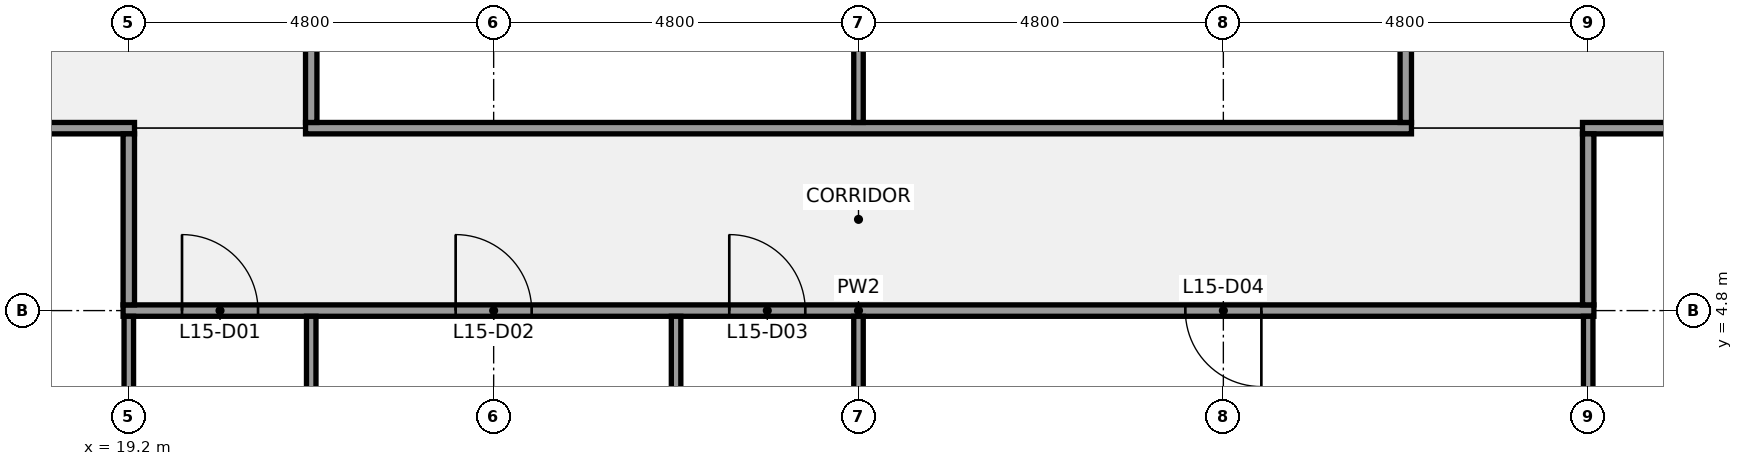
"""IFC4 building model, lengths in metres.
Left out: names, types, materials, properties, quantities, classifications, styles, units other than length and angle.
Written with IfcOpenShell. Run it as: python <this file> out.ifc"""

import sys

from ifc_helpers import new_model, si_unit, direction, frame, frame_2d, origin, place, context, subcontext, project, spatial, rectangle, extrude, element, fill, save


model = new_model("IFC4")
c1 = context("Model", 3, precision=1e-05, world=origin(), true_north=direction((0.0, 1.0)))
c2 = subcontext(c1, "Body", "Model", "MODEL_VIEW")
j1 = project(units=[si_unit("LENGTHUNIT", "METRE"), si_unit("PLANEANGLEUNIT", "RADIAN")], contexts=[c1])
p1 = place(None, origin())
s1 = spatial("IfcSite", under=j1, at=p1, CompositionType="ELEMENT")
p2 = place(p1, origin())
s2 = spatial("IfcBuilding", under=s1, at=p2, CompositionType="ELEMENT")
p3 = place(p2, frame((0.0, 0.0, 71.0)))
s3 = spatial("IfcBuildingStorey", under=s2, at=p3, CompositionType="ELEMENT", Elevation=71.0)
p4 = place(p3, frame((19.125, 4.8, 0.0), z_axis=(0.0, 0.0, 1.0), x_axis=(1.0, 0.0, 0.0)))
e1 = element("IfcWall", 1, at=p4, inside=s3, PredefinedType="PARTITIONING", context=c2, shape_type="SweptSolid", body=[
    extrude(rectangle(XDim=19.35, YDim=0.15, at=frame_2d((9.675, 0.0))), origin(), (0.0, 0.0, 1.0), 2.87),
])
p5 = place(p4, frame((0.775, 0.0, 0.0)))
e2 = element("IfcOpeningElement", 2, at=p5, cuts=e1, PredefinedType="OPENING", context=c2, shape_type="SweptSolid", body=[
    extrude(rectangle(XDim=1.0, YDim=2.1, at=frame_2d((0.5, 1.05))), frame((0.0, 0.085, 0.0), z_axis=(0.0, -1.0, 0.0), x_axis=(1.0, 0.0, 0.0)), (0.0, 0.0, 1.0), 0.17),
])
p6 = place(p4, frame((4.375, 0.0, 0.0)))
e3 = element("IfcOpeningElement", 3, at=p6, cuts=e1, PredefinedType="OPENING", context=c2, shape_type="SweptSolid", body=[
    extrude(rectangle(XDim=1.0, YDim=2.1, at=frame_2d((0.5, 1.05))), frame((0.0, 0.085, 0.0), z_axis=(0.0, -1.0, 0.0), x_axis=(1.0, 0.0, 0.0)), (0.0, 0.0, 1.0), 0.17),
])
p7 = place(p4, frame((7.975, 0.0, 0.0)))
e4 = element("IfcOpeningElement", 4, at=p7, cuts=e1, PredefinedType="OPENING", context=c2, shape_type="SweptSolid", body=[
    extrude(rectangle(XDim=1.0, YDim=2.1, at=frame_2d((0.5, 1.05))), frame((0.0, 0.085, 0.0), z_axis=(0.0, -1.0, 0.0), x_axis=(1.0, 0.0, 0.0)), (0.0, 0.0, 1.0), 0.17),
])
p8 = place(p4, frame((13.975, 0.0, 0.0)))
e5 = element("IfcOpeningElement", 5, at=p8, cuts=e1, PredefinedType="OPENING", context=c2, shape_type="SweptSolid", body=[
    extrude(rectangle(XDim=1.0, YDim=2.1, at=frame_2d((0.5, 1.05))), frame((0.0, 0.085, 0.0), z_axis=(0.0, -1.0, 0.0), x_axis=(1.0, 0.0, 0.0)), (0.0, 0.0, 1.0), 0.17),
])
p9 = place(p3, frame((14.325, 7.2, 0.0), z_axis=(0.0, 0.0, 1.0), x_axis=(1.0, 0.0, 0.0)))
e6 = element("IfcWall", 6, at=p9, inside=s3, PredefinedType="PARTITIONING", context=c2, shape_type="SweptSolid", body=[
    extrude(rectangle(XDim=4.95, YDim=0.15, at=frame_2d((2.475, 0.0))), origin(), (0.0, 0.0, 1.0), 2.87),
])
p10 = place(p9, frame((1.975, 0.0, 0.0)))
e7 = element("IfcOpeningElement", 7, at=p10, cuts=e6, PredefinedType="OPENING", context=c2, shape_type="SweptSolid", body=[
    extrude(rectangle(XDim=1.0, YDim=2.1, at=frame_2d((0.5, 1.05))), frame((0.0, 0.085, 0.0), z_axis=(0.0, -1.0, 0.0), x_axis=(1.0, 0.0, 0.0)), (0.0, 0.0, 1.0), 0.17),
])
p11 = place(p3, frame((21.525, 7.2, 0.0), z_axis=(0.0, 0.0, 1.0), x_axis=(1.0, 0.0, 0.0)))
e8 = element("IfcWall", 8, at=p11, inside=s3, PredefinedType="PARTITIONING", context=c2, shape_type="SweptSolid", body=[
    extrude(rectangle(XDim=14.55, YDim=0.15, at=frame_2d((7.275, 0.0))), origin(), (0.0, 0.0, 1.0), 2.87),
])
p12 = place(p3, frame((38.325, 7.2, 0.0), z_axis=(0.0, 0.0, 1.0), x_axis=(1.0, 0.0, 0.0)))
e9 = element("IfcWall", 9, at=p12, inside=s3, PredefinedType="PARTITIONING", context=c2, shape_type="SweptSolid", body=[
    extrude(rectangle(XDim=4.95, YDim=0.15, at=frame_2d((2.475, 0.0))), origin(), (0.0, 0.0, 1.0), 2.87),
])
p13 = place(p12, frame((1.975, 0.0, 0.0)))
e10 = element("IfcOpeningElement", 10, at=p13, cuts=e9, PredefinedType="OPENING", context=c2, shape_type="SweptSolid", body=[
    extrude(rectangle(XDim=1.0, YDim=2.1, at=frame_2d((0.5, 1.05))), frame((0.0, 0.085, 0.0), z_axis=(0.0, -1.0, 0.0), x_axis=(1.0, 0.0, 0.0)), (0.0, 0.0, 1.0), 0.17),
])
p14 = place(p3, frame((19.2, 0.65, 0.0), z_axis=(0.0, 0.0, 1.0), x_axis=(0.0, 1.0, 0.0)))
e11 = element("IfcWall", 11, at=p14, inside=s3, PredefinedType="PARTITIONING", context=c2, shape_type="SweptSolid", body=[
    extrude(rectangle(XDim=4.075, YDim=0.125, at=frame_2d((2.038, 0.0))), origin(), (0.0, 0.0, 1.0), 2.87),
])
p15 = place(p3, frame((19.2, 4.875, 0.0), z_axis=(0.0, 0.0, 1.0), x_axis=(0.0, 1.0, 0.0)))
e12 = element("IfcWall", 12, at=p15, inside=s3, PredefinedType="PARTITIONING", context=c2, shape_type="SweptSolid", body=[
    extrude(rectangle(XDim=2.25, YDim=0.15, at=frame_2d((1.125, 0.0))), origin(), (0.0, 0.0, 1.0), 2.87),
])
p16 = place(p3, frame((21.6, 0.1, 0.0), z_axis=(0.0, 0.0, 1.0), x_axis=(0.0, 1.0, 0.0)))
e13 = element("IfcWall", 13, at=p16, inside=s3, PredefinedType="PARTITIONING", context=c2, shape_type="SweptSolid", body=[
    extrude(rectangle(XDim=4.625, YDim=0.125, at=frame_2d((2.312, 0.0))), origin(), (0.0, 0.0, 1.0), 2.87),
])
p17 = place(p3, frame((21.6, 7.275, 0.0), z_axis=(0.0, 0.0, 1.0), x_axis=(0.0, 1.0, 0.0)))
e14 = element("IfcWall", 14, at=p17, inside=s3, PredefinedType="PARTITIONING", context=c2, shape_type="SweptSolid", body=[
    extrude(rectangle(XDim=7.062, YDim=0.15, at=frame_2d((3.531, 0.0))), origin(), (0.0, 0.0, 1.0), 2.87),
])
p18 = place(p17, frame((3.031, 0.0, 0.0)))
e15 = element("IfcOpeningElement", 15, at=p18, cuts=e14, PredefinedType="OPENING", context=c2, shape_type="SweptSolid", body=[
    extrude(rectangle(XDim=1.0, YDim=2.1, at=frame_2d((0.5, 1.05))), frame((0.0, 0.085, 0.0), z_axis=(0.0, -1.0, 0.0), x_axis=(1.0, 0.0, 0.0)), (0.0, 0.0, 1.0), 0.17),
])
p19 = place(p3, frame((26.4, 0.1, 0.0), z_axis=(0.0, 0.0, 1.0), x_axis=(0.0, 1.0, 0.0)))
e16 = element("IfcWall", 16, at=p19, inside=s3, PredefinedType="PARTITIONING", context=c2, shape_type="SweptSolid", body=[
    extrude(rectangle(XDim=4.625, YDim=0.125, at=frame_2d((2.312, 0.0))), origin(), (0.0, 0.0, 1.0), 2.87),
])
p20 = place(p3, frame((28.8, 0.65, 0.0), z_axis=(0.0, 0.0, 1.0), x_axis=(0.0, 1.0, 0.0)))
e17 = element("IfcWall", 17, at=p20, inside=s3, PredefinedType="PARTITIONING", context=c2, shape_type="SweptSolid", body=[
    extrude(rectangle(XDim=4.075, YDim=0.125, at=frame_2d((2.038, 0.0))), origin(), (0.0, 0.0, 1.0), 2.87),
])
p21 = place(p3, frame((28.8, 7.275, 0.0), z_axis=(0.0, 0.0, 1.0), x_axis=(0.0, 1.0, 0.0)))
e18 = element("IfcWall", 18, at=p21, inside=s3, PredefinedType="PARTITIONING", context=c2, shape_type="SweptSolid", body=[
    extrude(rectangle(XDim=7.062, YDim=0.125, at=frame_2d((3.531, 0.0))), origin(), (0.0, 0.0, 1.0), 2.87),
])
p22 = place(p3, frame((36.0, 7.275, 0.0), z_axis=(0.0, 0.0, 1.0), x_axis=(0.0, 1.0, 0.0)))
e19 = element("IfcWall", 19, at=p22, inside=s3, PredefinedType="PARTITIONING", context=c2, shape_type="SweptSolid", body=[
    extrude(rectangle(XDim=7.062, YDim=0.15, at=frame_2d((3.531, 0.0))), origin(), (0.0, 0.0, 1.0), 2.87),
])
p23 = place(p22, frame((3.031, 0.0, 0.0)))
e20 = element("IfcOpeningElement", 20, at=p23, cuts=e19, PredefinedType="OPENING", context=c2, shape_type="SweptSolid", body=[
    extrude(rectangle(XDim=1.0, YDim=2.1, at=frame_2d((0.5, 1.05))), frame((0.0, 0.085, 0.0), z_axis=(0.0, -1.0, 0.0), x_axis=(1.0, 0.0, 0.0)), (0.0, 0.0, 1.0), 0.17),
])
p24 = place(p3, frame((38.4, 0.65, 0.0), z_axis=(0.0, 0.0, 1.0), x_axis=(0.0, 1.0, 0.0)))
e21 = element("IfcWall", 21, at=p24, inside=s3, PredefinedType="PARTITIONING", context=c2, shape_type="SweptSolid", body=[
    extrude(rectangle(XDim=4.075, YDim=0.125, at=frame_2d((2.038, 0.0))), origin(), (0.0, 0.0, 1.0), 2.87),
])
p25 = place(p3, frame((38.4, 4.875, 0.0), z_axis=(0.0, 0.0, 1.0), x_axis=(0.0, 1.0, 0.0)))
e22 = element("IfcWall", 22, at=p25, inside=s3, PredefinedType="PARTITIONING", context=c2, shape_type="SweptSolid", body=[
    extrude(rectangle(XDim=2.25, YDim=0.15, at=frame_2d((1.125, 0.0))), origin(), (0.0, 0.0, 1.0), 2.87),
])
p26 = place(p5, origin())
e23 = element("IfcDoor", 23, at=p26, inside=s3, OperationType="SINGLE_SWING_LEFT", PredefinedType="DOOR", context=c2, shape_type="SweptSolid", body=[
    extrude(rectangle(XDim=1.0, YDim=2.1, at=frame_2d((0.5, 1.05))), frame((0.0, 0.025, 0.0), z_axis=(0.0, -1.0, 0.0), x_axis=(1.0, 0.0, 0.0)), (0.0, 0.0, 1.0), 0.05),
])
fill(e2, e23)
p27 = place(p6, origin())
e24 = element("IfcDoor", 24, at=p27, inside=s3, OperationType="SINGLE_SWING_LEFT", PredefinedType="DOOR", context=c2, shape_type="SweptSolid", body=[
    extrude(rectangle(XDim=1.0, YDim=2.1, at=frame_2d((0.5, 1.05))), frame((0.0, 0.025, 0.0), z_axis=(0.0, -1.0, 0.0), x_axis=(1.0, 0.0, 0.0)), (0.0, 0.0, 1.0), 0.05),
])
fill(e3, e24)
p28 = place(p7, origin())
e25 = element("IfcDoor", 25, at=p28, inside=s3, OperationType="SINGLE_SWING_LEFT", PredefinedType="DOOR", context=c2, shape_type="SweptSolid", body=[
    extrude(rectangle(XDim=1.0, YDim=2.1, at=frame_2d((0.5, 1.05))), frame((0.0, 0.025, 0.0), z_axis=(0.0, -1.0, 0.0), x_axis=(1.0, 0.0, 0.0)), (0.0, 0.0, 1.0), 0.05),
])
fill(e4, e25)
p29 = place(p8, origin())
e26 = element("IfcDoor", 26, at=p29, inside=s3, OperationType="SINGLE_SWING_RIGHT", PredefinedType="DOOR", context=c2, shape_type="SweptSolid", body=[
    extrude(rectangle(XDim=1.0, YDim=2.1, at=frame_2d((0.5, 1.05))), frame((0.0, 0.025, 0.0), z_axis=(0.0, -1.0, 0.0), x_axis=(1.0, 0.0, 0.0)), (0.0, 0.0, 1.0), 0.05),
])
fill(e5, e26)
save(model, sys.argv[1])
